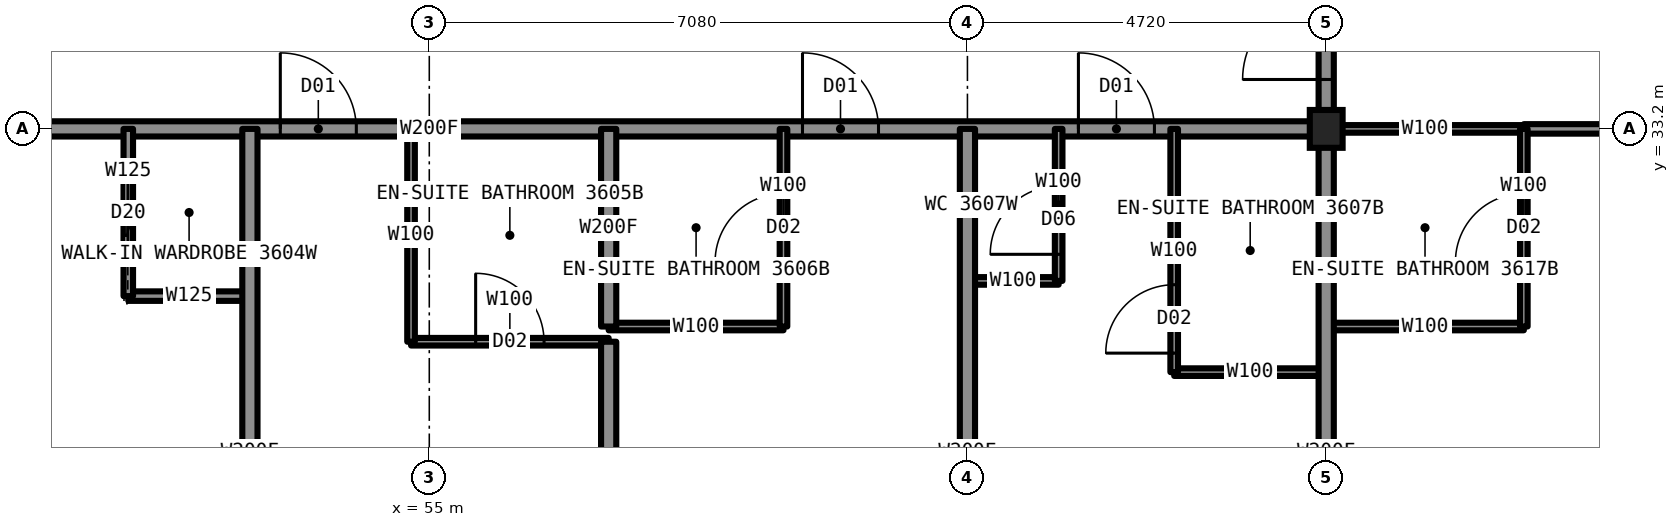
"""IFC4 building model, lengths in metres.
Left out: names, types, materials, properties, quantities, classifications, styles, units other than length and angle.
Written with IfcOpenShell. Run it as: python <this file> out.ifc"""

import sys

from ifc_helpers import new_model, si_unit, direction, frame, frame_2d, origin, origin_2d, place, context, subcontext, project, spatial, rectangle, i_section, extrude, element, fill, save


model = new_model("IFC4")
c1 = context("Model", 3, precision=1e-05, world=origin(), true_north=direction((0.0, 1.0)))
c2 = subcontext(c1, "Body", "Model", "MODEL_VIEW")
j1 = project(units=[si_unit("LENGTHUNIT", "METRE"), si_unit("PLANEANGLEUNIT", "RADIAN")], contexts=[c1])
p1 = place(None, origin())
s1 = spatial("IfcSite", under=j1, at=p1, CompositionType="ELEMENT")
p2 = place(p1, origin())
s2 = spatial("IfcBuilding", under=s1, at=p2, CompositionType="ELEMENT")
p3 = place(p2, frame((0.0, 0.0, 135.4)))
s3 = spatial("IfcBuildingStorey", under=s2, at=p3, CompositionType="ELEMENT", Elevation=135.4)
p4 = place(p3, frame((66.8, 33.2, 0.0), z_axis=(0.0, 0.0, 1.0), x_axis=(1.0, 0.0, 0.0)))
e1 = element("IfcColumn", 1, at=p4, inside=s3, PredefinedType="COLUMN", context=c2, shape_type="SweptSolid", body=[
    extrude(i_section(OverallWidth=0.432, OverallDepth=0.498, WebThickness=0.056, FlangeThickness=0.089, at=origin_2d()), origin(), (0.0, 0.0, 1.0), 3.5),
])
p5 = place(p3, frame((66.8, 33.2, 0.0), z_axis=(0.0, 0.0, 1.0), x_axis=(1.0, 0.0, 0.0)))
e2 = element("IfcWall", 2, at=p5, inside=s3, PredefinedType="PARTITIONING", context=c2, shape_type="SweptSolid", body=[
    extrude(rectangle(XDim=2.6, YDim=0.1, at=frame_2d((1.3, 0.0))), origin(), (0.0, 0.0, 1.0), 2.573),
])
p6 = place(p3, frame((43.2, 33.2, 0.0), z_axis=(0.0, 0.0, 1.0), x_axis=(1.0, 0.0, 0.0)))
e3 = element("IfcWall", 3, at=p6, inside=s3, PredefinedType="PARTITIONING", context=c2, shape_type="SweptSolid", body=[
    extrude(rectangle(XDim=23.6, YDim=0.2, at=frame_2d((11.8, 0.0))), origin(), (0.0, 0.0, 1.0), 3.33),
])
p7 = place(p6, frame((3.0, 0.0, 0.0)))
e4 = element("IfcOpeningElement", 4, at=p7, cuts=e3, PredefinedType="OPENING", context=c2, shape_type="SweptSolid", body=[
    extrude(rectangle(XDim=1.0, YDim=2.2, at=frame_2d((0.5, 1.1))), frame((0.0, 0.11, 0.0), z_axis=(0.0, -1.0, 0.0), x_axis=(1.0, 0.0, 0.0)), (0.0, 0.0, 1.0), 0.22),
])
p8 = place(p6, frame((9.84, 0.0, 0.0)))
e5 = element("IfcOpeningElement", 5, at=p8, cuts=e3, PredefinedType="OPENING", context=c2, shape_type="SweptSolid", body=[
    extrude(rectangle(XDim=1.0, YDim=2.2, at=frame_2d((0.5, 1.1))), frame((0.0, 0.11, 0.0), z_axis=(0.0, -1.0, 0.0), x_axis=(1.0, 0.0, 0.0)), (0.0, 0.0, 1.0), 0.22),
])
p9 = place(p6, frame((16.71, 0.0, 0.0)))
e6 = element("IfcOpeningElement", 6, at=p9, cuts=e3, PredefinedType="OPENING", context=c2, shape_type="SweptSolid", body=[
    extrude(rectangle(XDim=1.0, YDim=2.2, at=frame_2d((0.5, 1.1))), frame((0.0, 0.11, 0.0), z_axis=(0.0, -1.0, 0.0), x_axis=(1.0, 0.0, 0.0)), (0.0, 0.0, 1.0), 0.22),
])
p10 = place(p6, frame((20.34, 0.0, 0.0)))
e7 = element("IfcOpeningElement", 7, at=p10, cuts=e3, PredefinedType="OPENING", context=c2, shape_type="SweptSolid", body=[
    extrude(rectangle(XDim=1.0, YDim=2.2, at=frame_2d((0.5, 1.1))), frame((0.0, 0.11, 0.0), z_axis=(0.0, -1.0, 0.0), x_axis=(1.0, 0.0, 0.0)), (0.0, 0.0, 1.0), 0.22),
])
p11 = place(p3, frame((69.4, 33.2, 0.0), z_axis=(0.0, 0.0, 1.0), x_axis=(1.0, 0.0, 0.0)))
e8 = element("IfcWall", 8, at=p11, inside=s3, PredefinedType="PARTITIONING", context=c2, shape_type="SweptSolid", body=[
    extrude(rectangle(XDim=5.9, YDim=0.125, at=frame_2d((2.95, 0.0))), origin(), (0.0, 0.0, 1.0), 2.573),
])
p12 = place(p11, frame((1.15, 0.0, 0.0)))
e9 = element("IfcOpeningElement", 9, at=p12, cuts=e8, PredefinedType="OPENING", context=c2, shape_type="SweptSolid", body=[
    extrude(rectangle(XDim=0.9, YDim=2.2, at=frame_2d((0.45, 1.1))), frame((0.0, 0.073, 0.0), z_axis=(0.0, -1.0, 0.0), x_axis=(1.0, 0.0, 0.0)), (0.0, 0.0, 1.0), 0.145),
])
p13 = place(p3, frame((62.08, 31.2, 0.0), z_axis=(0.0, 0.0, 1.0), x_axis=(1.0, 0.0, 0.0)))
e10 = element("IfcWall", 10, at=p13, inside=s3, PredefinedType="PARTITIONING", context=c2, shape_type="SweptSolid", body=[
    extrude(rectangle(XDim=1.2, YDim=0.1, at=frame_2d((0.6, 0.0))), origin(), (0.0, 0.0, 1.0), 3.33),
])
p14 = place(p3, frame((51.04, 31.0, 0.0), z_axis=(0.0, 0.0, 1.0), x_axis=(1.0, 0.0, 0.0)))
e11 = element("IfcWall", 11, at=p14, inside=s3, PredefinedType="PARTITIONING", context=c2, shape_type="SweptSolid", body=[
    extrude(rectangle(XDim=1.6, YDim=0.125, at=frame_2d((0.8, 0.0))), origin(), (0.0, 0.0, 1.0), 3.33),
])
p15 = place(p3, frame((57.36, 30.6, 0.0), z_axis=(0.0, 0.0, 1.0), x_axis=(1.0, 0.0, 0.0)))
e12 = element("IfcWall", 12, at=p15, inside=s3, PredefinedType="PARTITIONING", context=c2, shape_type="SweptSolid", body=[
    extrude(rectangle(XDim=2.3, YDim=0.1, at=frame_2d((1.15, 0.0))), origin(), (0.0, 0.0, 1.0), 3.33),
])
p16 = place(p3, frame((66.8, 30.6, 0.0), z_axis=(0.0, 0.0, 1.0), x_axis=(1.0, 0.0, 0.0)))
e13 = element("IfcWall", 13, at=p16, inside=s3, PredefinedType="PARTITIONING", context=c2, shape_type="SweptSolid", body=[
    extrude(rectangle(XDim=2.6, YDim=0.1, at=frame_2d((1.3, 0.0))), origin(), (0.0, 0.0, 1.0), 3.33),
])
p17 = place(p3, frame((54.76, 30.4, 0.0), z_axis=(0.0, 0.0, 1.0), x_axis=(1.0, 0.0, 0.0)))
e14 = element("IfcWall", 14, at=p17, inside=s3, PredefinedType="PARTITIONING", context=c2, shape_type="SweptSolid", body=[
    extrude(rectangle(XDim=2.6, YDim=0.1, at=frame_2d((1.3, 0.0))), origin(), (0.0, 0.0, 1.0), 3.33),
])
p18 = place(p17, frame((0.85, 0.0, 0.0)))
e15 = element("IfcOpeningElement", 15, at=p18, cuts=e14, PredefinedType="OPENING", context=c2, shape_type="SweptSolid", body=[
    extrude(rectangle(XDim=0.9, YDim=2.1, at=frame_2d((0.45, 1.05))), frame((0.0, 0.06, 0.0), z_axis=(0.0, -1.0, 0.0), x_axis=(1.0, 0.0, 0.0)), (0.0, 0.0, 1.0), 0.12),
])
p19 = place(p3, frame((64.8, 30.0, 0.0), z_axis=(0.0, 0.0, 1.0), x_axis=(1.0, 0.0, 0.0)))
e16 = element("IfcWall", 16, at=p19, inside=s3, PredefinedType="PARTITIONING", context=c2, shape_type="SweptSolid", body=[
    extrude(rectangle(XDim=2.0, YDim=0.1, at=frame_2d((1.0, 0.0))), origin(), (0.0, 0.0, 1.0), 2.731),
])
p20 = place(p3, frame((54.76, 30.4, 0.0), z_axis=(0.0, 0.0, 1.0), x_axis=(0.0, 1.0, 0.0)))
e17 = element("IfcWall", 17, at=p20, inside=s3, PredefinedType="PARTITIONING", context=c2, shape_type="SweptSolid", body=[
    extrude(rectangle(XDim=2.8, YDim=0.1, at=frame_2d((1.4, 0.0))), origin(), (0.0, 0.0, 1.0), 3.33),
])
p21 = place(p3, frame((52.64, 24.7, 0.0), z_axis=(0.0, 0.0, 1.0), x_axis=(0.0, 1.0, 0.0)))
e18 = element("IfcWall", 18, at=p21, inside=s3, PredefinedType="PARTITIONING", context=c2, shape_type="SweptSolid", body=[
    extrude(rectangle(XDim=8.5, YDim=0.2, at=frame_2d((4.25, 0.0))), origin(), (0.0, 0.0, 1.0), 3.33),
])
p22 = place(p3, frame((51.04, 31.0, 0.0), z_axis=(0.0, 0.0, 1.0), x_axis=(0.0, 1.0, 0.0)))
e19 = element("IfcWall", 19, at=p22, inside=s3, PredefinedType="PARTITIONING", context=c2, shape_type="SweptSolid", body=[
    extrude(rectangle(XDim=2.2, YDim=0.125, at=frame_2d((1.1, 0.0))), origin(), (0.0, 0.0, 1.0), 3.33),
])
p23 = place(p22, frame((0.7, 0.0, 0.0)))
e20 = element("IfcOpeningElement", 20, at=p23, cuts=e19, PredefinedType="OPENING", context=c2, shape_type="SweptSolid", body=[
    extrude(rectangle(XDim=0.8, YDim=2.1, at=frame_2d((0.4, 1.05))), frame((0.0, 0.073, 0.0), z_axis=(0.0, -1.0, 0.0), x_axis=(1.0, 0.0, 0.0)), (0.0, 0.0, 1.0), 0.145),
])
p24 = place(p3, frame((66.8, 33.2, 0.0), z_axis=(0.0, 0.0, 1.0), x_axis=(0.0, 1.0, 0.0)))
e21 = element("IfcWall", 21, at=p24, inside=s3, PredefinedType="PARTITIONING", context=c2, shape_type="SweptSolid", body=[
    extrude(rectangle(XDim=23.6, YDim=0.2, at=frame_2d((11.8, 0.0))), origin(), (0.0, 0.0, 1.0), 3.33),
])
p25 = place(p24, frame((7.27, 0.0, 0.0)))
e22 = element("IfcOpeningElement", 22, at=p25, cuts=e21, PredefinedType="OPENING", context=c2, shape_type="SweptSolid", body=[
    extrude(rectangle(XDim=1.0, YDim=2.2, at=frame_2d((0.5, 1.1))), frame((0.0, 0.11, 0.0), z_axis=(0.0, -1.0, 0.0), x_axis=(1.0, 0.0, 0.0)), (0.0, 0.0, 1.0), 0.22),
])
p26 = place(p24, frame((11.99, 0.0, 0.0)))
e23 = element("IfcOpeningElement", 23, at=p26, cuts=e21, PredefinedType="OPENING", context=c2, shape_type="SweptSolid", body=[
    extrude(rectangle(XDim=1.0, YDim=2.2, at=frame_2d((0.5, 1.1))), frame((0.0, 0.11, 0.0), z_axis=(0.0, -1.0, 0.0), x_axis=(1.0, 0.0, 0.0)), (0.0, 0.0, 1.0), 0.22),
])
p27 = place(p24, frame((17.31, 0.0, 0.0)))
e24 = element("IfcOpeningElement", 24, at=p27, cuts=e21, PredefinedType="OPENING", context=c2, shape_type="SweptSolid", body=[
    extrude(rectangle(XDim=1.0, YDim=2.2, at=frame_2d((0.5, 1.1))), frame((0.0, 0.11, 0.0), z_axis=(0.0, -1.0, 0.0), x_axis=(1.0, 0.0, 0.0)), (0.0, 0.0, 1.0), 0.22),
])
p28 = place(p24, frame((21.85, 0.0, 0.0)))
e25 = element("IfcOpeningElement", 25, at=p28, cuts=e21, PredefinedType="OPENING", context=c2, shape_type="SweptSolid", body=[
    extrude(rectangle(XDim=1.1, YDim=2.2, at=frame_2d((0.55, 1.1))), frame((0.0, 0.11, 0.0), z_axis=(0.0, -1.0, 0.0), x_axis=(1.0, 0.0, 0.0)), (0.0, 0.0, 1.0), 0.22),
])
p29 = place(p24, frame((0.65, 0.0, 0.0)))
e26 = element("IfcOpeningElement", 26, at=p29, cuts=e21, PredefinedType="OPENING", context=c2, shape_type="SweptSolid", body=[
    extrude(rectangle(XDim=1.1, YDim=2.2, at=frame_2d((0.55, 1.1))), frame((0.0, 0.11, 0.0), z_axis=(0.0, -1.0, 0.0), x_axis=(1.0, 0.0, 0.0)), (0.0, 0.0, 1.0), 0.22),
])
p30 = place(p3, frame((66.8, 24.7, 0.0), z_axis=(0.0, 0.0, 1.0), x_axis=(0.0, 1.0, 0.0)))
e27 = element("IfcWall", 27, at=p30, inside=s3, PredefinedType="PARTITIONING", context=c2, shape_type="SweptSolid", body=[
    extrude(rectangle(XDim=8.5, YDim=0.2, at=frame_2d((4.25, 0.0))), origin(), (0.0, 0.0, 1.0), 2.573),
])
p31 = place(p3, frame((69.4, 30.6, 0.0), z_axis=(0.0, 0.0, 1.0), x_axis=(0.0, 1.0, 0.0)))
e28 = element("IfcWall", 28, at=p31, inside=s3, PredefinedType="PARTITIONING", context=c2, shape_type="SweptSolid", body=[
    extrude(rectangle(XDim=2.6, YDim=0.1, at=frame_2d((1.3, 0.0))), origin(), (0.0, 0.0, 1.0), 3.33),
])
p32 = place(p31, frame((0.85, 0.0, 0.0)))
e29 = element("IfcOpeningElement", 29, at=p32, cuts=e28, PredefinedType="OPENING", context=c2, shape_type="SweptSolid", body=[
    extrude(rectangle(XDim=0.9, YDim=2.1, at=frame_2d((0.45, 1.05))), frame((0.0, 0.06, 0.0), z_axis=(0.0, -1.0, 0.0), x_axis=(1.0, 0.0, 0.0)), (0.0, 0.0, 1.0), 0.12),
])
p33 = place(p3, frame((57.36, 24.7, 0.0), z_axis=(0.0, 0.0, 1.0), x_axis=(0.0, 1.0, 0.0)))
e30 = element("IfcWall", 30, at=p33, inside=s3, PredefinedType="PARTITIONING", context=c2, shape_type="SweptSolid", body=[
    extrude(rectangle(XDim=5.7, YDim=0.2, at=frame_2d((2.85, 0.0))), origin(), (0.0, 0.0, 1.0), 3.33),
])
p34 = place(p3, frame((57.36, 30.6, 0.0), z_axis=(0.0, 0.0, 1.0), x_axis=(0.0, 1.0, 0.0)))
e31 = element("IfcWall", 31, at=p34, inside=s3, PredefinedType="PARTITIONING", context=c2, shape_type="SweptSolid", body=[
    extrude(rectangle(XDim=2.6, YDim=0.2, at=frame_2d((1.3, 0.0))), origin(), (0.0, 0.0, 1.0), 3.33),
])
p35 = place(p3, frame((59.66, 30.6, 0.0), z_axis=(0.0, 0.0, 1.0), x_axis=(0.0, 1.0, 0.0)))
e32 = element("IfcWall", 32, at=p35, inside=s3, PredefinedType="PARTITIONING", context=c2, shape_type="SweptSolid", body=[
    extrude(rectangle(XDim=2.6, YDim=0.1, at=frame_2d((1.3, 0.0))), origin(), (0.0, 0.0, 1.0), 3.33),
])
p36 = place(p35, frame((0.85, 0.0, 0.0)))
e33 = element("IfcOpeningElement", 33, at=p36, cuts=e32, PredefinedType="OPENING", context=c2, shape_type="SweptSolid", body=[
    extrude(rectangle(XDim=0.9, YDim=2.1, at=frame_2d((0.45, 1.05))), frame((0.0, 0.06, 0.0), z_axis=(0.0, -1.0, 0.0), x_axis=(1.0, 0.0, 0.0)), (0.0, 0.0, 1.0), 0.12),
])
p37 = place(p3, frame((62.08, 24.7, 0.0), z_axis=(0.0, 0.0, 1.0), x_axis=(0.0, 1.0, 0.0)))
e34 = element("IfcWall", 34, at=p37, inside=s3, PredefinedType="PARTITIONING", context=c2, shape_type="SweptSolid", body=[
    extrude(rectangle(XDim=8.5, YDim=0.2, at=frame_2d((4.25, 0.0))), origin(), (0.0, 0.0, 1.0), 2.573),
])
p38 = place(p3, frame((63.28, 31.2, 0.0), z_axis=(0.0, 0.0, 1.0), x_axis=(0.0, 1.0, 0.0)))
e35 = element("IfcWall", 35, at=p38, inside=s3, PredefinedType="PARTITIONING", context=c2, shape_type="SweptSolid", body=[
    extrude(rectangle(XDim=2.0, YDim=0.1, at=frame_2d((1.0, 0.0))), origin(), (0.0, 0.0, 1.0), 3.33),
])
p39 = place(p38, frame((0.35, 0.0, 0.0)))
e36 = element("IfcOpeningElement", 36, at=p39, cuts=e35, PredefinedType="OPENING", context=c2, shape_type="SweptSolid", body=[
    extrude(rectangle(XDim=0.9, YDim=2.1, at=frame_2d((0.45, 1.05))), frame((0.0, 0.06, 0.0), z_axis=(0.0, -1.0, 0.0), x_axis=(1.0, 0.0, 0.0)), (0.0, 0.0, 1.0), 0.12),
])
p40 = place(p3, frame((64.8, 30.0, 0.0), z_axis=(0.0, 0.0, 1.0), x_axis=(0.0, 1.0, 0.0)))
e37 = element("IfcWall", 37, at=p40, inside=s3, PredefinedType="PARTITIONING", context=c2, shape_type="SweptSolid", body=[
    extrude(rectangle(XDim=3.2, YDim=0.1, at=frame_2d((1.6, 0.0))), origin(), (0.0, 0.0, 1.0), 3.33),
])
p41 = place(p40, frame((0.25, 0.0, 0.0)))
e38 = element("IfcOpeningElement", 38, at=p41, cuts=e37, PredefinedType="OPENING", context=c2, shape_type="SweptSolid", body=[
    extrude(rectangle(XDim=0.9, YDim=2.1, at=frame_2d((0.45, 1.05))), frame((0.0, 0.06, 0.0), z_axis=(0.0, -1.0, 0.0), x_axis=(1.0, 0.0, 0.0)), (0.0, 0.0, 1.0), 0.12),
])
p42 = place(p23, origin())
e39 = element("IfcDoor", 39, at=p42, inside=s3, OperationType="SLIDING_TO_LEFT", PredefinedType="DOOR", context=c2, shape_type="SweptSolid", body=[
    extrude(rectangle(XDim=0.8, YDim=2.1, at=frame_2d((0.4, 1.05))), frame((0.0, 0.025, 0.0), z_axis=(0.0, -1.0, 0.0), x_axis=(1.0, 0.0, 0.0)), (0.0, 0.0, 1.0), 0.05),
])
fill(e20, e39)
p43 = place(p8, origin())
e40 = element("IfcDoor", 40, at=p43, inside=s3, OperationType="SINGLE_SWING_LEFT", PredefinedType="DOOR", context=c2, shape_type="SweptSolid", body=[
    extrude(rectangle(XDim=1.0, YDim=2.2, at=frame_2d((0.5, 1.1))), frame((0.0, 0.025, 0.0), z_axis=(0.0, -1.0, 0.0), x_axis=(1.0, 0.0, 0.0)), (0.0, 0.0, 1.0), 0.05),
])
fill(e5, e40)
p44 = place(p18, origin())
e41 = element("IfcDoor", 41, at=p44, inside=s3, OperationType="SINGLE_SWING_RIGHT", PredefinedType="DOOR", context=c2, shape_type="SweptSolid", body=[
    extrude(rectangle(XDim=0.9, YDim=2.1, at=frame_2d((0.45, 1.05))), frame((0.0, 0.025, 0.0), z_axis=(0.0, -1.0, 0.0), x_axis=(1.0, 0.0, 0.0)), (0.0, 0.0, 1.0), 0.05),
])
fill(e15, e41)
p45 = place(p9, origin())
e42 = element("IfcDoor", 42, at=p45, inside=s3, OperationType="SINGLE_SWING_LEFT", PredefinedType="DOOR", context=c2, shape_type="SweptSolid", body=[
    extrude(rectangle(XDim=1.0, YDim=2.2, at=frame_2d((0.5, 1.1))), frame((0.0, 0.025, 0.0), z_axis=(0.0, -1.0, 0.0), x_axis=(1.0, 0.0, 0.0)), (0.0, 0.0, 1.0), 0.05),
])
fill(e6, e42)
p46 = place(p36, origin())
e43 = element("IfcDoor", 43, at=p46, inside=s3, OperationType="SINGLE_SWING_RIGHT", PredefinedType="DOOR", context=c2, shape_type="SweptSolid", body=[
    extrude(rectangle(XDim=0.9, YDim=2.1, at=frame_2d((0.45, 1.05))), frame((0.0, 0.025, 0.0), z_axis=(0.0, -1.0, 0.0), x_axis=(1.0, 0.0, 0.0)), (0.0, 0.0, 1.0), 0.05),
])
fill(e33, e43)
p47 = place(p10, origin())
e44 = element("IfcDoor", 44, at=p47, inside=s3, OperationType="SINGLE_SWING_LEFT", PredefinedType="DOOR", context=c2, shape_type="SweptSolid", body=[
    extrude(rectangle(XDim=1.0, YDim=2.2, at=frame_2d((0.5, 1.1))), frame((0.0, 0.025, 0.0), z_axis=(0.0, -1.0, 0.0), x_axis=(1.0, 0.0, 0.0)), (0.0, 0.0, 1.0), 0.05),
])
fill(e7, e44)
p48 = place(p41, origin())
e45 = element("IfcDoor", 45, at=p48, inside=s3, OperationType="SINGLE_SWING_RIGHT", PredefinedType="DOOR", context=c2, shape_type="SweptSolid", body=[
    extrude(rectangle(XDim=0.9, YDim=2.1, at=frame_2d((0.45, 1.05))), frame((0.0, 0.025, 0.0), z_axis=(0.0, -1.0, 0.0), x_axis=(1.0, 0.0, 0.0)), (0.0, 0.0, 1.0), 0.05),
])
fill(e38, e45)
p49 = place(p39, origin())
e46 = element("IfcDoor", 46, at=p49, inside=s3, OperationType="SINGLE_SWING_LEFT", PredefinedType="DOOR", context=c2, shape_type="SweptSolid", body=[
    extrude(rectangle(XDim=0.9, YDim=2.1, at=frame_2d((0.45, 1.05))), frame((0.0, 0.025, 0.0), z_axis=(0.0, -1.0, 0.0), x_axis=(1.0, 0.0, 0.0)), (0.0, 0.0, 1.0), 0.05),
])
fill(e36, e46)
p50 = place(p29, origin())
e47 = element("IfcDoor", 47, at=p50, inside=s3, OperationType="SINGLE_SWING_LEFT", PredefinedType="DOOR", context=c2, shape_type="SweptSolid", body=[
    extrude(rectangle(XDim=1.1, YDim=2.2, at=frame_2d((0.55, 1.1))), frame((0.0, 0.025, 0.0), z_axis=(0.0, -1.0, 0.0), x_axis=(1.0, 0.0, 0.0)), (0.0, 0.0, 1.0), 0.05),
])
fill(e26, e47)
p51 = place(p32, origin())
e48 = element("IfcDoor", 48, at=p51, inside=s3, OperationType="SINGLE_SWING_RIGHT", PredefinedType="DOOR", context=c2, shape_type="SweptSolid", body=[
    extrude(rectangle(XDim=0.9, YDim=2.1, at=frame_2d((0.45, 1.05))), frame((0.0, 0.025, 0.0), z_axis=(0.0, -1.0, 0.0), x_axis=(1.0, 0.0, 0.0)), (0.0, 0.0, 1.0), 0.05),
])
fill(e29, e48)
save(model, sys.argv[1])
